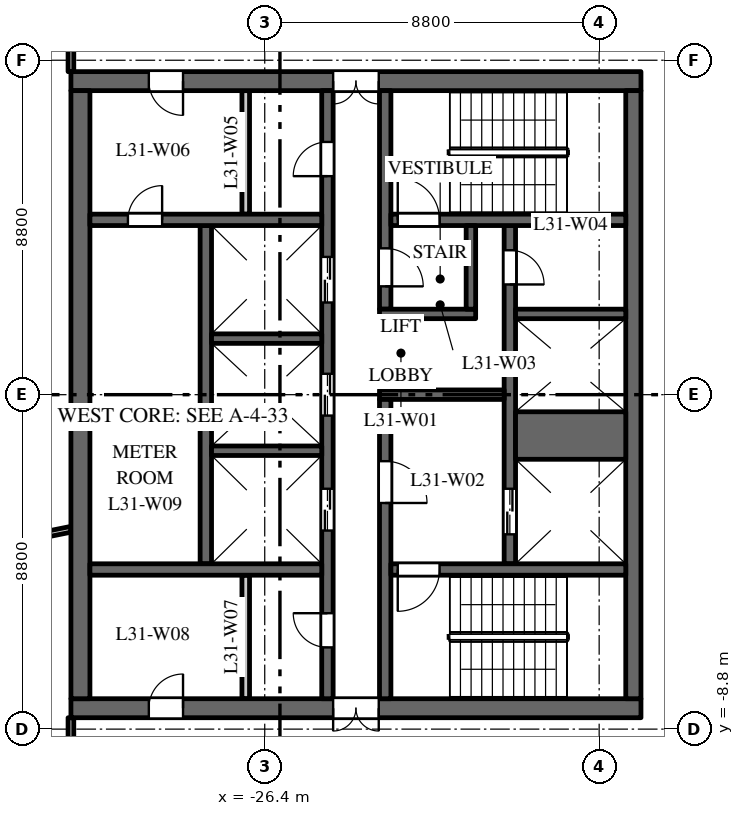
"""IFC4 building model, lengths in metres.
Left out: names, types, materials, properties, quantities, classifications, styles, units other than length and angle.
Written with IfcOpenShell. Run it as: python <this file> out.ifc"""

import sys

from ifc_helpers import new_model, si_unit, direction, frame, frame_2d, origin, place, context, subcontext, project, spatial, rectangle, extrude, element, fill, save


model = new_model("IFC4")
c1 = context("Model", 3, precision=1e-05, world=origin(), true_north=direction((0.0, 1.0)))
c2 = subcontext(c1, "Body", "Model", "MODEL_VIEW")
j1 = project(units=[si_unit("LENGTHUNIT", "METRE"), si_unit("PLANEANGLEUNIT", "RADIAN")], contexts=[c1])
p1 = place(None, origin())
s1 = spatial("IfcSite", under=j1, at=p1, CompositionType="ELEMENT")
p2 = place(p1, origin())
s2 = spatial("IfcBuilding", under=s1, at=p2, CompositionType="ELEMENT")
p3 = place(p2, frame((0.0, 0.0, 136.0)))
s3 = spatial("IfcBuildingStorey", under=s2, at=p3, CompositionType="ELEMENT", Elevation=136.0)
p4 = place(p3, frame((-16.5, 8.25, 0.0), z_axis=(0.0, 0.0, 1.0), x_axis=(-1.0, 0.0, 0.0)))
e1 = element("IfcWall", 1, at=p4, inside=s3, PredefinedType="SHEAR", context=c2, shape_type="SweptSolid", body=[
    extrude(rectangle(XDim=15.0, YDim=0.5, at=frame_2d((7.5, 0.0))), origin(), (0.0, 0.0, 1.0), 3.7),
])
p5 = place(p4, frame((6.9, 0.0, 0.0)))
e2 = element("IfcOpeningElement", 2, at=p5, cuts=e1, PredefinedType="OPENING", context=c2, shape_type="SweptSolid", body=[
    extrude(rectangle(XDim=1.2, YDim=2.1, at=frame_2d((0.6, 1.05))), frame((0.0, 0.26, 0.0), z_axis=(0.0, -1.0, 0.0), x_axis=(1.0, 0.0, 0.0)), (0.0, 0.0, 1.0), 0.52),
])
p6 = place(p4, frame((12.05, 0.0, 0.0)))
e3 = element("IfcOpeningElement", 3, at=p6, cuts=e1, PredefinedType="OPENING", context=c2, shape_type="SweptSolid", body=[
    extrude(rectangle(XDim=0.9, YDim=2.1, at=frame_2d((0.45, 1.05))), frame((0.0, 0.26, 0.0), z_axis=(0.0, -1.0, 0.0), x_axis=(1.0, 0.0, 0.0)), (0.0, 0.0, 1.0), 0.52),
])
p7 = place(p3, frame((-16.5, -8.25, 0.0), z_axis=(0.0, 0.0, 1.0), x_axis=(-1.0, 0.0, 0.0)))
e4 = element("IfcWall", 4, at=p7, inside=s3, PredefinedType="SHEAR", context=c2, shape_type="SweptSolid", body=[
    extrude(rectangle(XDim=15.0, YDim=0.5, at=frame_2d((7.5, 0.0))), origin(), (0.0, 0.0, 1.0), 3.7),
])
p8 = place(p7, frame((6.9, 0.0, 0.0)))
e5 = element("IfcOpeningElement", 5, at=p8, cuts=e4, PredefinedType="OPENING", context=c2, shape_type="SweptSolid", body=[
    extrude(rectangle(XDim=1.2, YDim=2.1, at=frame_2d((0.6, 1.05))), frame((0.0, 0.26, 0.0), z_axis=(0.0, -1.0, 0.0), x_axis=(1.0, 0.0, 0.0)), (0.0, 0.0, 1.0), 0.52),
])
p9 = place(p7, frame((12.05, 0.0, 0.0)))
e6 = element("IfcOpeningElement", 6, at=p9, cuts=e4, PredefinedType="OPENING", context=c2, shape_type="SweptSolid", body=[
    extrude(rectangle(XDim=0.9, YDim=2.1, at=frame_2d((0.45, 1.05))), frame((0.0, 0.26, 0.0), z_axis=(0.0, -1.0, 0.0), x_axis=(1.0, 0.0, 0.0)), (0.0, 0.0, 1.0), 0.52),
])
p10 = place(p3, frame((-27.95, -4.45, 0.0), z_axis=(0.0, 0.0, 1.0), x_axis=(0.0, 1.0, 0.0)))
e7 = element("IfcWall", 7, at=p10, inside=s3, PredefinedType="SHEAR", context=c2, shape_type="SweptSolid", body=[
    extrude(rectangle(XDim=8.9, YDim=0.3, at=frame_2d((4.45, 0.0))), origin(), (0.0, 0.0, 1.0), 3.7),
])
p11 = place(p3, frame((-19.95, -4.45, 0.0), z_axis=(0.0, 0.0, 1.0), x_axis=(0.0, 1.0, 0.0)))
e8 = element("IfcWall", 8, at=p11, inside=s3, PredefinedType="SHEAR", context=c2, shape_type="SweptSolid", body=[
    extrude(rectangle(XDim=8.9, YDim=0.3, at=frame_2d((4.45, 0.0))), origin(), (0.0, 0.0, 1.0), 3.7),
])
p12 = place(p11, frame((0.775, 0.0, 0.0)))
e9 = element("IfcOpeningElement", 9, at=p12, cuts=e8, PredefinedType="OPENING", context=c2, shape_type="SweptSolid", body=[
    extrude(rectangle(XDim=1.2, YDim=2.1, at=frame_2d((0.6, 1.05))), frame((0.0, 0.16, 0.0), z_axis=(0.0, -1.0, 0.0), x_axis=(1.0, 0.0, 0.0)), (0.0, 0.0, 1.0), 0.32),
])
p13 = place(p11, frame((7.35, 0.0, 0.0)))
e10 = element("IfcOpeningElement", 10, at=p13, cuts=e8, PredefinedType="OPENING", context=c2, shape_type="SweptSolid", body=[
    extrude(rectangle(XDim=0.9, YDim=2.1, at=frame_2d((0.45, 1.05))), frame((0.0, 0.16, 0.0), z_axis=(0.0, -1.0, 0.0), x_axis=(1.0, 0.0, 0.0)), (0.0, 0.0, 1.0), 0.32),
])
p14 = place(p3, frame((-24.75, -8.0, 0.0), z_axis=(0.0, 0.0, 1.0), x_axis=(0.0, 1.0, 0.0)))
e11 = element("IfcWall", 11, at=p14, inside=s3, PredefinedType="SHEAR", context=c2, shape_type="SweptSolid", body=[
    extrude(rectangle(XDim=16.0, YDim=0.3, at=frame_2d((8.0, 0.0))), origin(), (0.0, 0.0, 1.0), 3.7),
])
p15 = place(p14, frame((4.425, 0.0, 0.0)))
e12 = element("IfcOpeningElement", 12, at=p15, cuts=e11, PredefinedType="OPENING", context=c2, shape_type="SweptSolid", body=[
    extrude(rectangle(XDim=1.1, YDim=2.1, at=frame_2d((0.55, 1.05))), frame((0.0, 0.16, 0.0), z_axis=(0.0, -1.0, 0.0), x_axis=(1.0, 0.0, 0.0)), (0.0, 0.0, 1.0), 0.32),
])
p16 = place(p14, frame((7.45, 0.0, 0.0)))
e13 = element("IfcOpeningElement", 13, at=p16, cuts=e11, PredefinedType="OPENING", context=c2, shape_type="SweptSolid", body=[
    extrude(rectangle(XDim=1.1, YDim=2.1, at=frame_2d((0.55, 1.05))), frame((0.0, 0.16, 0.0), z_axis=(0.0, -1.0, 0.0), x_axis=(1.0, 0.0, 0.0)), (0.0, 0.0, 1.0), 0.32),
])
p17 = place(p14, frame((10.425, 0.0, 0.0)))
e14 = element("IfcOpeningElement", 14, at=p17, cuts=e11, PredefinedType="OPENING", context=c2, shape_type="SweptSolid", body=[
    extrude(rectangle(XDim=1.2, YDim=2.1, at=frame_2d((0.6, 1.05))), frame((0.0, 0.16, 0.0), z_axis=(0.0, -1.0, 0.0), x_axis=(1.0, 0.0, 0.0)), (0.0, 0.0, 1.0), 0.32),
])
p18 = place(p14, frame((13.75, 0.0, 0.0)))
e15 = element("IfcOpeningElement", 15, at=p18, cuts=e11, PredefinedType="OPENING", context=c2, shape_type="SweptSolid", body=[
    extrude(rectangle(XDim=0.9, YDim=2.1, at=frame_2d((0.45, 1.05))), frame((0.0, 0.16, 0.0), z_axis=(0.0, -1.0, 0.0), x_axis=(1.0, 0.0, 0.0)), (0.0, 0.0, 1.0), 0.32),
])
p19 = place(p14, frame((1.35, 0.0, 0.0)))
e16 = element("IfcOpeningElement", 16, at=p19, cuts=e11, PredefinedType="OPENING", context=c2, shape_type="SweptSolid", body=[
    extrude(rectangle(XDim=0.9, YDim=2.1, at=frame_2d((0.45, 1.05))), frame((0.0, 0.16, 0.0), z_axis=(0.0, -1.0, 0.0), x_axis=(1.0, 0.0, 0.0)), (0.0, 0.0, 1.0), 0.32),
])
p20 = place(p3, frame((-20.1, 0.0, 0.0), z_axis=(0.0, 0.0, 1.0), x_axis=(-1.0, 0.0, 0.0)))
e17 = element("IfcWall", 17, at=p20, inside=s3, PredefinedType="SHEAR", context=c2, shape_type="SweptSolid", body=[
    extrude(rectangle(XDim=3.28, YDim=0.25, at=frame_2d((1.64, 0.0))), origin(), (0.0, 0.0, 1.0), 3.7),
])
p21 = place(p3, frame((-16.7, -8.0, 0.0), z_axis=(0.0, 0.0, 1.0), x_axis=(0.0, 1.0, 0.0)))
e18 = element("IfcWall", 18, at=p21, inside=s3, PredefinedType="SHEAR", context=c2, shape_type="SweptSolid", body=[
    extrude(rectangle(XDim=16.0, YDim=0.4, at=frame_2d((8.0, 0.0))), origin(), (0.0, 0.0, 1.0), 3.7),
])
p22 = place(p3, frame((-31.25, -8.0, 0.0), z_axis=(0.0, 0.0, 1.0), x_axis=(0.0, 1.0, 0.0)))
e19 = element("IfcWall", 19, at=p22, inside=s3, PredefinedType="SHEAR", context=c2, shape_type="SweptSolid", body=[
    extrude(rectangle(XDim=16.0, YDim=0.5, at=frame_2d((8.0, 0.0))), origin(), (0.0, 0.0, 1.0), 3.7),
])
p23 = place(p3, frame((-24.9, 4.6, 0.0), z_axis=(0.0, 0.0, 1.0), x_axis=(-1.0, 0.0, 0.0)))
e20 = element("IfcWall", 20, at=p23, inside=s3, PredefinedType="SHEAR", context=c2, shape_type="SweptSolid", body=[
    extrude(rectangle(XDim=6.1, YDim=0.3, at=frame_2d((3.05, 0.0))), origin(), (0.0, 0.0, 1.0), 3.7),
])
p24 = place(p23, frame((4.2, 0.0, 0.0)))
e21 = element("IfcOpeningElement", 21, at=p24, cuts=e20, PredefinedType="OPENING", context=c2, shape_type="SweptSolid", body=[
    extrude(rectangle(XDim=0.9, YDim=2.1, at=frame_2d((0.45, 1.05))), frame((0.0, 0.16, 0.0), z_axis=(0.0, -1.0, 0.0), x_axis=(1.0, 0.0, 0.0)), (0.0, 0.0, 1.0), 0.32),
])
for number, where, z_axis, x_axis in (
    (22, (-26.9, 4.75, 0.0), (0.0, 0.0, 1.0), (0.0, 1.0, 0.0)),
    (23, (-26.9, -8.0, 0.0), (0.0, 0.0, 1.0), (0.0, 1.0, 0.0)),
):
    element("IfcWall", number, at=place(p3, frame(where, z_axis=z_axis, x_axis=x_axis)), inside=s3, PredefinedType="PARTITIONING", context=c2, shape_type="SweptSolid", body=[
        extrude(rectangle(XDim=3.25, YDim=0.2, at=frame_2d((1.625, 0.0))), origin(), (0.0, 0.0, 1.0), 3.7),
    ])
p25 = place(p3, frame((-24.9, -4.6, 0.0), z_axis=(0.0, 0.0, 1.0), x_axis=(-1.0, 0.0, 0.0)))
e24 = element("IfcWall", 24, at=p25, inside=s3, PredefinedType="SHEAR", context=c2, shape_type="SweptSolid", body=[
    extrude(rectangle(XDim=6.1, YDim=0.3, at=frame_2d((3.05, 0.0))), origin(), (0.0, 0.0, 1.0), 3.7),
])
p26 = place(p3, frame((-16.9, -1.075, 0.0), z_axis=(0.0, 0.0, 1.0), x_axis=(-1.0, 0.0, 0.0)))
e25 = element("IfcWall", 25, at=p26, inside=s3, PredefinedType="SHEAR", context=c2, shape_type="SweptSolid", body=[
    extrude(rectangle(XDim=2.9, YDim=1.25, at=frame_2d((1.45, 0.0))), origin(), (0.0, 0.0, 1.0), 3.7),
])
for number, where, z_axis, x_axis in (
    (26, (-16.9, 2.125, 0.0), (0.0, 0.0, 1.0), (-1.0, 0.0, 0.0)),
    (27, (-24.9, -1.475, 0.0), (0.0, 0.0, 1.0), (-1.0, 0.0, 0.0)),
    (28, (-24.9, 1.475, 0.0), (0.0, 0.0, 1.0), (-1.0, 0.0, 0.0)),
):
    element("IfcWall", number, at=place(p3, frame(where, z_axis=z_axis, x_axis=x_axis)), inside=s3, PredefinedType="SHEAR", context=c2, shape_type="SweptSolid", body=[
        extrude(rectangle(XDim=2.9, YDim=0.25, at=frame_2d((1.45, 0.0))), origin(), (0.0, 0.0, 1.0), 3.7),
    ])
p27 = place(p3, frame((-23.23, 2.25, 0.0), z_axis=(0.0, 0.0, 1.0), x_axis=(0.0, 1.0, 0.0)))
e29 = element("IfcWall", 29, at=p27, inside=s3, PredefinedType="SHEAR", context=c2, shape_type="SweptSolid", body=[
    extrude(rectangle(XDim=5.75, YDim=0.3, at=frame_2d((2.875, 0.0))), origin(), (0.0, 0.0, 1.0), 3.7),
])
p28 = place(p27, frame((0.6, 0.0, 0.0)))
e30 = element("IfcOpeningElement", 30, at=p28, cuts=e29, PredefinedType="OPENING", context=c2, shape_type="SweptSolid", body=[
    extrude(rectangle(XDim=1.0, YDim=2.1, at=frame_2d((0.5, 1.05))), frame((0.0, 0.16, 0.0), z_axis=(0.0, -1.0, 0.0), x_axis=(1.0, 0.0, 0.0)), (0.0, 0.0, 1.0), 0.32),
])
p29 = place(p3, frame((-23.23, -8.0, 0.0), z_axis=(0.0, 0.0, 1.0), x_axis=(0.0, 1.0, 0.0)))
e31 = element("IfcWall", 31, at=p29, inside=s3, PredefinedType="SHEAR", context=c2, shape_type="SweptSolid", body=[
    extrude(rectangle(XDim=7.875, YDim=0.3, at=frame_2d((3.938, 0.0))), origin(), (0.0, 0.0, 1.0), 3.7),
])
p30 = place(p29, frame((5.15, 0.0, 0.0)))
e32 = element("IfcOpeningElement", 32, at=p30, cuts=e31, PredefinedType="OPENING", context=c2, shape_type="SweptSolid", body=[
    extrude(rectangle(XDim=1.1, YDim=2.1, at=frame_2d((0.55, 1.05))), frame((0.0, 0.16, 0.0), z_axis=(0.0, -1.0, 0.0), x_axis=(1.0, 0.0, 0.0)), (0.0, 0.0, 1.0), 0.32),
])
p31 = place(p3, frame((-16.9, 4.6, 0.0), z_axis=(0.0, 0.0, 1.0), x_axis=(-1.0, 0.0, 0.0)))
e33 = element("IfcWall", 33, at=p31, inside=s3, PredefinedType="SHEAR", context=c2, shape_type="SweptSolid", body=[
    extrude(rectangle(XDim=6.18, YDim=0.3, at=frame_2d((3.09, 0.0))), origin(), (0.0, 0.0, 1.0), 3.7),
])
p32 = place(p31, frame((4.9, 0.0, 0.0)))
e34 = element("IfcOpeningElement", 34, at=p32, cuts=e33, PredefinedType="OPENING", context=c2, shape_type="SweptSolid", body=[
    extrude(rectangle(XDim=1.1, YDim=2.1, at=frame_2d((0.55, 1.05))), frame((0.0, 0.16, 0.0), z_axis=(0.0, -1.0, 0.0), x_axis=(1.0, 0.0, 0.0)), (0.0, 0.0, 1.0), 0.32),
])
p33 = place(p3, frame((-16.9, -4.6, 0.0), z_axis=(0.0, 0.0, 1.0), x_axis=(-1.0, 0.0, 0.0)))
e35 = element("IfcWall", 35, at=p33, inside=s3, PredefinedType="SHEAR", context=c2, shape_type="SweptSolid", body=[
    extrude(rectangle(XDim=6.18, YDim=0.3, at=frame_2d((3.09, 0.0))), origin(), (0.0, 0.0, 1.0), 3.7),
])
p34 = place(p33, frame((4.9, 0.0, 0.0)))
e36 = element("IfcOpeningElement", 36, at=p34, cuts=e35, PredefinedType="OPENING", context=c2, shape_type="SweptSolid", body=[
    extrude(rectangle(XDim=1.1, YDim=2.1, at=frame_2d((0.55, 1.05))), frame((0.0, 0.16, 0.0), z_axis=(0.0, -1.0, 0.0), x_axis=(1.0, 0.0, 0.0)), (0.0, 0.0, 1.0), 0.32),
])
p35 = place(p3, frame((-20.85, 2.125, 0.0), z_axis=(0.0, 0.0, 1.0), x_axis=(-1.0, 0.0, 0.0)))
e37 = element("IfcWall", 37, at=p35, inside=s3, PredefinedType="SHEAR", context=c2, shape_type="SweptSolid", body=[
    extrude(rectangle(XDim=2.53, YDim=0.25, at=frame_2d((1.265, 0.0))), origin(), (0.0, 0.0, 1.0), 3.7),
])
p36 = place(p3, frame((-20.975, 2.25, 0.0), z_axis=(0.0, 0.0, 1.0), x_axis=(0.0, 1.0, 0.0)))
e38 = element("IfcWall", 38, at=p36, inside=s3, PredefinedType="SHEAR", context=c2, shape_type="SweptSolid", body=[
    extrude(rectangle(XDim=2.2, YDim=0.25, at=frame_2d((1.1, 0.0))), origin(), (0.0, 0.0, 1.0), 3.7),
])
p37 = place(p3, frame((-35.512, -4.349, 0.0), z_axis=(0.0, 0.0, 1.0), x_axis=(0.980357474535, 0.197228857227, 0.0)))
e39 = element("IfcWall", 39, at=p37, inside=s3, PredefinedType="PARTITIONING", context=c2, shape_type="SweptSolid", body=[
    extrude(rectangle(XDim=4.092, YDim=0.15, at=frame_2d((2.046, 0.0))), origin(), (0.0, 0.0, 1.0), 3.2),
])
for number, where, z_axis, x_axis in (
    (40, (-31.5, -10.7, 0.0), (0.0, 0.0, 1.0), (0.0, 1.0, 0.0)),
    (41, (-31.5, 8.5, 0.0), (0.0, 0.0, 1.0), (0.0, 1.0, 0.0)),
):
    element("IfcWall", number, at=place(p3, frame(where, z_axis=z_axis, x_axis=x_axis)), inside=s3, PredefinedType="PARTITIONING", context=c2, shape_type="SweptSolid", body=[
        extrude(rectangle(XDim=2.2, YDim=0.15, at=frame_2d((1.1, 0.0))), origin(), (0.0, 0.0, 1.0), 3.7),
    ])
p38 = place(p12, origin())
e42 = element("IfcDoor", 42, at=p38, inside=s3, OperationType="DOUBLE_DOOR_SLIDING", PredefinedType="DOOR", context=c2, shape_type="SweptSolid", body=[
    extrude(rectangle(XDim=1.2, YDim=2.1, at=frame_2d((0.6, 1.05))), frame((0.0, 0.025, 0.0), z_axis=(0.0, -1.0, 0.0), x_axis=(1.0, 0.0, 0.0)), (0.0, 0.0, 1.0), 0.05),
])
fill(e9, e42)
p39 = place(p15, origin())
e43 = element("IfcDoor", 43, at=p39, inside=s3, OperationType="DOUBLE_DOOR_SLIDING", PredefinedType="DOOR", context=c2, shape_type="SweptSolid", body=[
    extrude(rectangle(XDim=1.1, YDim=2.1, at=frame_2d((0.55, 1.05))), frame((0.0, 0.025, 0.0), z_axis=(0.0, -1.0, 0.0), x_axis=(1.0, 0.0, 0.0)), (0.0, 0.0, 1.0), 0.05),
])
fill(e12, e43)
p40 = place(p16, origin())
e44 = element("IfcDoor", 44, at=p40, inside=s3, OperationType="DOUBLE_DOOR_SLIDING", PredefinedType="DOOR", context=c2, shape_type="SweptSolid", body=[
    extrude(rectangle(XDim=1.1, YDim=2.1, at=frame_2d((0.55, 1.05))), frame((0.0, 0.025, 0.0), z_axis=(0.0, -1.0, 0.0), x_axis=(1.0, 0.0, 0.0)), (0.0, 0.0, 1.0), 0.05),
])
fill(e13, e44)
p41 = place(p17, origin())
e45 = element("IfcDoor", 45, at=p41, inside=s3, OperationType="DOUBLE_DOOR_SLIDING", PredefinedType="DOOR", context=c2, shape_type="SweptSolid", body=[
    extrude(rectangle(XDim=1.2, YDim=2.1, at=frame_2d((0.6, 1.05))), frame((0.0, 0.025, 0.0), z_axis=(0.0, -1.0, 0.0), x_axis=(1.0, 0.0, 0.0)), (0.0, 0.0, 1.0), 0.05),
])
fill(e14, e45)
p42 = place(p32, origin())
e46 = element("IfcDoor", 46, at=p42, inside=s3, OperationType="SINGLE_SWING_RIGHT", PredefinedType="DOOR", context=c2, shape_type="SweptSolid", body=[
    extrude(rectangle(XDim=1.1, YDim=2.1, at=frame_2d((0.55, 1.05))), frame((0.0, 0.025, 0.0), z_axis=(0.0, -1.0, 0.0), x_axis=(1.0, 0.0, 0.0)), (0.0, 0.0, 1.0), 0.05),
])
fill(e34, e46)
p43 = place(p34, origin())
e47 = element("IfcDoor", 47, at=p43, inside=s3, OperationType="SINGLE_SWING_LEFT", PredefinedType="DOOR", context=c2, shape_type="SweptSolid", body=[
    extrude(rectangle(XDim=1.1, YDim=2.1, at=frame_2d((0.55, 1.05))), frame((0.0, 0.025, 0.0), z_axis=(0.0, -1.0, 0.0), x_axis=(1.0, 0.0, 0.0)), (0.0, 0.0, 1.0), 0.05),
])
fill(e36, e47)
p44 = place(p30, origin())
e48 = element("IfcDoor", 48, at=p44, inside=s3, OperationType="SINGLE_SWING_LEFT", PredefinedType="DOOR", context=c2, shape_type="SweptSolid", body=[
    extrude(rectangle(XDim=1.1, YDim=2.1, at=frame_2d((0.55, 1.05))), frame((0.0, 0.025, 0.0), z_axis=(0.0, -1.0, 0.0), x_axis=(1.0, 0.0, 0.0)), (0.0, 0.0, 1.0), 0.05),
])
fill(e32, e48)
p45 = place(p28, origin())
e49 = element("IfcDoor", 49, at=p45, inside=s3, OperationType="SINGLE_SWING_LEFT", PredefinedType="DOOR", context=c2, shape_type="SweptSolid", body=[
    extrude(rectangle(XDim=1.0, YDim=2.1, at=frame_2d((0.5, 1.05))), frame((0.0, 0.025, 0.0), z_axis=(0.0, -1.0, 0.0), x_axis=(1.0, 0.0, 0.0)), (0.0, 0.0, 1.0), 0.05),
])
fill(e30, e49)
p46 = place(p5, origin())
e50 = element("IfcDoor", 50, at=p46, inside=s3, OperationType="DOUBLE_DOOR_DOUBLE_SWING", PredefinedType="DOOR", context=c2, shape_type="SweptSolid", body=[
    extrude(rectangle(XDim=1.2, YDim=2.1, at=frame_2d((0.6, 1.05))), frame((0.0, 0.025, 0.0), z_axis=(0.0, -1.0, 0.0), x_axis=(1.0, 0.0, 0.0)), (0.0, 0.0, 1.0), 0.05),
])
fill(e2, e50)
p47 = place(p8, origin())
e51 = element("IfcDoor", 51, at=p47, inside=s3, OperationType="DOUBLE_DOOR_DOUBLE_SWING", PredefinedType="DOOR", context=c2, shape_type="SweptSolid", body=[
    extrude(rectangle(XDim=1.2, YDim=2.1, at=frame_2d((0.6, 1.05))), frame((0.0, 0.025, 0.0), z_axis=(0.0, -1.0, 0.0), x_axis=(1.0, 0.0, 0.0)), (0.0, 0.0, 1.0), 0.05),
])
fill(e5, e51)
p48 = place(p13, origin())
e52 = element("IfcDoor", 52, at=p48, inside=s3, OperationType="SINGLE_SWING_LEFT", PredefinedType="DOOR", context=c2, shape_type="SweptSolid", body=[
    extrude(rectangle(XDim=0.9, YDim=2.1, at=frame_2d((0.45, 1.05))), frame((0.0, 0.025, 0.0), z_axis=(0.0, -1.0, 0.0), x_axis=(1.0, 0.0, 0.0)), (0.0, 0.0, 1.0), 0.05),
])
fill(e10, e52)
p49 = place(p18, origin())
e53 = element("IfcDoor", 53, at=p49, inside=s3, OperationType="SINGLE_SWING_RIGHT", PredefinedType="DOOR", context=c2, shape_type="SweptSolid", body=[
    extrude(rectangle(XDim=0.9, YDim=2.1, at=frame_2d((0.45, 1.05))), frame((0.0, 0.025, 0.0), z_axis=(0.0, -1.0, 0.0), x_axis=(1.0, 0.0, 0.0)), (0.0, 0.0, 1.0), 0.05),
])
fill(e15, e53)
p50 = place(p6, origin())
e54 = element("IfcDoor", 54, at=p50, inside=s3, OperationType="SINGLE_SWING_RIGHT", PredefinedType="DOOR", context=c2, shape_type="SweptSolid", body=[
    extrude(rectangle(XDim=0.9, YDim=2.1, at=frame_2d((0.45, 1.05))), frame((0.0, 0.025, 0.0), z_axis=(0.0, -1.0, 0.0), x_axis=(1.0, 0.0, 0.0)), (0.0, 0.0, 1.0), 0.05),
])
fill(e3, e54)
p51 = place(p19, origin())
e55 = element("IfcDoor", 55, at=p51, inside=s3, OperationType="SINGLE_SWING_LEFT", PredefinedType="DOOR", context=c2, shape_type="SweptSolid", body=[
    extrude(rectangle(XDim=0.9, YDim=2.1, at=frame_2d((0.45, 1.05))), frame((0.0, 0.025, 0.0), z_axis=(0.0, -1.0, 0.0), x_axis=(1.0, 0.0, 0.0)), (0.0, 0.0, 1.0), 0.05),
])
fill(e16, e55)
p52 = place(p9, origin())
e56 = element("IfcDoor", 56, at=p52, inside=s3, OperationType="SINGLE_SWING_LEFT", PredefinedType="DOOR", context=c2, shape_type="SweptSolid", body=[
    extrude(rectangle(XDim=0.9, YDim=2.1, at=frame_2d((0.45, 1.05))), frame((0.0, 0.025, 0.0), z_axis=(0.0, -1.0, 0.0), x_axis=(1.0, 0.0, 0.0)), (0.0, 0.0, 1.0), 0.05),
])
fill(e6, e56)
p53 = place(p24, origin())
e57 = element("IfcDoor", 57, at=p53, inside=s3, OperationType="SINGLE_SWING_LEFT", PredefinedType="DOOR", context=c2, shape_type="SweptSolid", body=[
    extrude(rectangle(XDim=0.9, YDim=2.1, at=frame_2d((0.45, 1.05))), frame((0.0, 0.025, 0.0), z_axis=(0.0, -1.0, 0.0), x_axis=(1.0, 0.0, 0.0)), (0.0, 0.0, 1.0), 0.05),
])
fill(e21, e57)
save(model, sys.argv[1])
